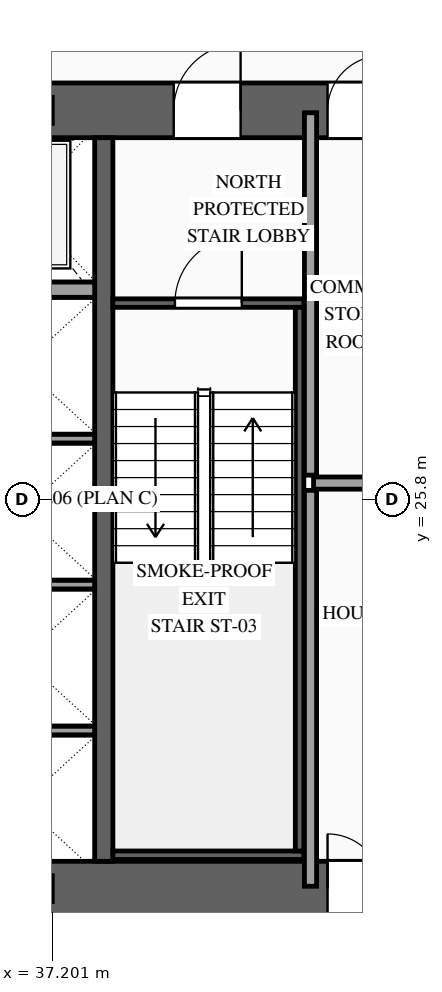
"""IFC4 building model, lengths in metres.
Left out: names, types, materials, properties, quantities, classifications, styles, units other than length and angle.
Written with IfcOpenShell. Run it as: python <this file> out.ifc"""

import sys

from ifc_helpers import new_model, si_unit, direction, frame, frame_2d, origin, origin_2d, place, context, subcontext, project, spatial, rectangle, i_section, extrude, source, transform, mapped, element, fill, save


model = new_model("IFC4")
c1 = context("Model", 3, precision=1e-05, world=origin(), true_north=direction((0.0, 1.0)))
c2 = subcontext(c1, "Body", "Model", "MODEL_VIEW")
j1 = project(units=[si_unit("LENGTHUNIT", "METRE"), si_unit("PLANEANGLEUNIT", "RADIAN")], contexts=[c1])
p1 = place(None, origin())
s1 = spatial("IfcSite", under=j1, at=p1, CompositionType="ELEMENT")
p2 = place(p1, origin())
s2 = spatial("IfcBuilding", under=s1, at=p2, CompositionType="ELEMENT")
p3 = place(p2, frame((0.0, 0.0, 67.6)))
s3 = spatial("IfcBuildingStorey", under=s2, at=p3, CompositionType="ELEMENT", Elevation=67.6)
p4 = place(p3, frame((23.35, 19.4, 0.0), z_axis=(0.0, 0.0, 1.0), x_axis=(1.0, 0.0, 0.0)))
e1 = element("IfcWall", 1, at=p4, inside=s3, PredefinedType="SHEAR", context=c2, shape_type="SweptSolid", body=[
    extrude(rectangle(XDim=27.3, YDim=0.9, at=frame_2d((13.65, 0.0))), origin(), (0.0, 0.0, 1.0), 3.6),
])
p5 = place(p4, frame((2.1, 0.0, 0.0)))
e2 = element("IfcOpeningElement", 2, at=p5, cuts=e1, PredefinedType="OPENING", context=c2, shape_type="SweptSolid", body=[
    extrude(rectangle(XDim=1.1, YDim=2.2, at=frame_2d((0.55, 1.1))), frame((0.0, 0.465, 0.0), z_axis=(0.0, -1.0, 0.0), x_axis=(1.0, 0.0, 0.0)), (0.0, 0.0, 1.0), 0.93),
])
p6 = place(p4, frame((10.0, 0.0, 0.0)))
e3 = element("IfcOpeningElement", 3, at=p6, cuts=e1, PredefinedType="OPENING", context=c2, shape_type="SweptSolid", body=[
    extrude(rectangle(XDim=1.1, YDim=2.2, at=frame_2d((0.55, 1.1))), frame((0.0, 0.465, 0.0), z_axis=(0.0, -1.0, 0.0), x_axis=(1.0, 0.0, 0.0)), (0.0, 0.0, 1.0), 0.93),
])
p7 = place(p4, frame((23.2, 0.0, 0.0)))
e4 = element("IfcOpeningElement", 4, at=p7, cuts=e1, PredefinedType="OPENING", context=c2, shape_type="SweptSolid", body=[
    extrude(rectangle(XDim=1.1, YDim=2.2, at=frame_2d((0.55, 1.1))), frame((0.0, 0.465, 0.0), z_axis=(0.0, -1.0, 0.0), x_axis=(1.0, 0.0, 0.0)), (0.0, 0.0, 1.0), 0.93),
])
p8 = place(p4, frame((19.82, 0.0, 0.0)))
e5 = element("IfcOpeningElement", 5, at=p8, cuts=e1, PredefinedType="OPENING", context=c2, shape_type="SweptSolid", body=[
    extrude(rectangle(XDim=0.9, YDim=2.15, at=frame_2d((0.45, 1.075))), frame((0.0, 0.465, 0.0), z_axis=(0.0, -1.0, 0.0), x_axis=(1.0, 0.0, 0.0)), (0.0, 0.0, 1.0), 0.93),
])
p9 = place(p4, frame((18.38, 0.0, 0.0)))
e6 = element("IfcOpeningElement", 6, at=p9, cuts=e1, PredefinedType="OPENING", context=c2, shape_type="SweptSolid", body=[
    extrude(rectangle(XDim=0.9, YDim=2.15, at=frame_2d((0.45, 1.075))), frame((0.0, 0.465, 0.0), z_axis=(0.0, -1.0, 0.0), x_axis=(1.0, 0.0, 0.0)), (0.0, 0.0, 1.0), 0.93),
])
p10 = place(p3, frame((23.35, 32.2, 0.0), z_axis=(0.0, 0.0, 1.0), x_axis=(1.0, 0.0, 0.0)))
e7 = element("IfcWall", 7, at=p10, inside=s3, PredefinedType="SHEAR", context=c2, shape_type="SweptSolid", body=[
    extrude(rectangle(XDim=27.3, YDim=0.9, at=frame_2d((13.65, 0.0))), origin(), (0.0, 0.0, 1.0), 3.6),
])
p11 = place(p10, frame((4.72, 0.0, 0.0)))
e8 = element("IfcOpeningElement", 8, at=p11, cuts=e7, PredefinedType="OPENING", context=c2, shape_type="SweptSolid", body=[
    extrude(rectangle(XDim=0.9, YDim=2.15, at=frame_2d((0.45, 1.075))), frame((0.0, 0.465, 0.0), z_axis=(0.0, -1.0, 0.0), x_axis=(1.0, 0.0, 0.0)), (0.0, 0.0, 1.0), 0.93),
])
p12 = place(p10, frame((10.0, 0.0, 0.0)))
e9 = element("IfcOpeningElement", 9, at=p12, cuts=e7, PredefinedType="OPENING", context=c2, shape_type="SweptSolid", body=[
    extrude(rectangle(XDim=1.1, YDim=2.2, at=frame_2d((0.55, 1.1))), frame((0.0, 0.465, 0.0), z_axis=(0.0, -1.0, 0.0), x_axis=(1.0, 0.0, 0.0)), (0.0, 0.0, 1.0), 0.93),
])
p13 = place(p10, frame((15.85, 0.0, 0.0)))
e10 = element("IfcOpeningElement", 10, at=p13, cuts=e7, PredefinedType="OPENING", context=c2, shape_type="SweptSolid", body=[
    extrude(rectangle(XDim=1.1, YDim=2.2, at=frame_2d((0.55, 1.1))), frame((0.0, 0.465, 0.0), z_axis=(0.0, -1.0, 0.0), x_axis=(1.0, 0.0, 0.0)), (0.0, 0.0, 1.0), 0.93),
])
p14 = place(p10, frame((18.38, 0.0, 0.0)))
e11 = element("IfcOpeningElement", 11, at=p14, cuts=e7, PredefinedType="OPENING", context=c2, shape_type="SweptSolid", body=[
    extrude(rectangle(XDim=0.9, YDim=2.15, at=frame_2d((0.45, 1.075))), frame((0.0, 0.465, 0.0), z_axis=(0.0, -1.0, 0.0), x_axis=(1.0, 0.0, 0.0)), (0.0, 0.0, 1.0), 0.93),
])
p15 = place(p10, frame((19.82, 0.0, 0.0)))
e12 = element("IfcOpeningElement", 12, at=p15, cuts=e7, PredefinedType="OPENING", context=c2, shape_type="SweptSolid", body=[
    extrude(rectangle(XDim=0.9, YDim=2.15, at=frame_2d((0.45, 1.075))), frame((0.0, 0.465, 0.0), z_axis=(0.0, -1.0, 0.0), x_axis=(1.0, 0.0, 0.0)), (0.0, 0.0, 1.0), 0.93),
])
m1 = source(origin(), c2, "Body", "SweptSolid", [
    extrude(rectangle(XDim=11.9, YDim=0.3, at=frame_2d((5.95, 0.0))), origin(), (0.0, 0.0, 1.0), 3.6),
])
p16 = place(p3, frame((38.05, 19.85, 0.0), z_axis=(0.0, 0.0, 1.0), x_axis=(0.0, 1.0, 0.0)))
e13 = element("IfcWall", 13, at=p16, inside=s3, PredefinedType="SOLIDWALL", context=c2, shape_type="MappedRepresentation", body=[
    mapped(m1, transform((0.0, 0.0, 0.0), scale=1.0)),
])
m2 = source(origin(), c2, "Body", "SweptSolid", [
    extrude(i_section(OverallWidth=0.407, OverallDepth=0.428, WebThickness=0.02, FlangeThickness=0.035, at=origin_2d()), origin(), (0.0, 0.0, 1.0), 3.6),
])
for number, where, z_axis, x_axis in (
    (14, (37.0, 19.4, 0.0), (0.0, 0.0, 1.0), (1.0, 0.0, 0.0)),
    (15, (37.0, 32.2, 0.0), (0.0, 0.0, 1.0), (1.0, 0.0, 0.0)),
):
    element("IfcColumn", number, at=place(p3, frame(where, z_axis=z_axis, x_axis=x_axis)), inside=s3, PredefinedType="COLUMN", context=c2, shape_type="MappedRepresentation", body=[
        mapped(m2, transform((0.0, 0.0, 0.0), scale=1.0)),
    ])
m3 = source(origin(), c2, "Body", "SweptSolid", [
    extrude(rectangle(XDim=2.4, YDim=0.14, at=frame_2d((1.2, 0.0))), origin(), (0.0, 0.0, 1.0), 3.38),
])
for number, where, z_axis, x_axis in (
    (16, (35.5, 22.0, 0.0), (0.0, 0.0, 1.0), (1.0, 0.0, 0.0)),
    (17, (35.5, 24.4, 0.0), (0.0, 0.0, 1.0), (1.0, 0.0, 0.0)),
    (18, (35.5, 26.8, 0.0), (0.0, 0.0, 1.0), (1.0, 0.0, 0.0)),
):
    element("IfcWall", number, at=place(p3, frame(where, z_axis=z_axis, x_axis=x_axis)), inside=s3, PredefinedType="SOLIDWALL", context=c2, shape_type="MappedRepresentation", body=[
        mapped(m3, transform((0.0, 0.0, 0.0), scale=1.0)),
    ])
m4 = source(origin(), c2, "Body", "SweptSolid", [
    extrude(rectangle(XDim=2.4, YDim=0.25, at=frame_2d((1.2, 0.0))), origin(), (0.0, 0.0, 1.0), 3.38),
])
p17 = place(p3, frame((35.5, 29.25, 0.0), z_axis=(0.0, 0.0, 1.0), x_axis=(1.0, 0.0, 0.0)))
e19 = element("IfcWall", 19, at=p17, inside=s3, PredefinedType="SOLIDWALL", context=c2, shape_type="MappedRepresentation", body=[
    mapped(m4, transform((0.0, 0.0, 0.0), scale=1.0)),
])
p18 = place(p3, frame((38.2, 29.03, 0.0), z_axis=(0.0, 0.0, 1.0), x_axis=(1.0, 0.0, 0.0)))
e20 = element("IfcWall", 20, at=p18, inside=s3, PredefinedType="SOLIDWALL", context=c2, shape_type="SweptSolid", body=[
    extrude(rectangle(XDim=3.14, YDim=0.14, at=frame_2d((1.57, 0.0))), origin(), (0.0, 0.0, 1.0), 3.38),
])
p19 = place(p18, frame((1.02, 0.0, 0.0)))
e21 = element("IfcOpeningElement", 21, at=p19, cuts=e20, PredefinedType="OPENING", context=c2, shape_type="SweptSolid", body=[
    extrude(rectangle(XDim=1.1, YDim=2.2, at=frame_2d((0.55, 1.1))), frame((0.0, 0.085, 0.0), z_axis=(0.0, -1.0, 0.0), x_axis=(1.0, 0.0, 0.0)), (0.0, 0.0, 1.0), 0.17),
])
m5 = source(origin(), c2, "Body", "SweptSolid", [
    extrude(rectangle(XDim=3.14, YDim=0.14, at=frame_2d((1.57, 0.0))), origin(), (0.0, 0.0, 1.0), 3.38),
])
p20 = place(p3, frame((38.2, 19.95, 0.0), z_axis=(0.0, 0.0, 1.0), x_axis=(1.0, 0.0, 0.0)))
e22 = element("IfcWall", 22, at=p20, inside=s3, PredefinedType="SOLIDWALL", context=c2, shape_type="MappedRepresentation", body=[
    mapped(m5, transform((0.0, 0.0, 0.0), scale=1.0)),
])
m6 = source(origin(), c2, "Body", "SweptSolid", [
    extrude(rectangle(XDim=8.94, YDim=0.14, at=frame_2d((4.47, 0.0))), origin(), (0.0, 0.0, 1.0), 3.38),
])
p21 = place(p3, frame((41.27, 20.02, 0.0), z_axis=(0.0, 0.0, 1.0), x_axis=(0.0, 1.0, 0.0)))
e23 = element("IfcWall", 23, at=p21, inside=s3, PredefinedType="SOLIDWALL", context=c2, shape_type="MappedRepresentation", body=[
    mapped(m6, transform((0.0, 0.0, 0.0), scale=1.0)),
])
m7 = source(origin(), c2, "Body", "SweptSolid", [
    extrude(rectangle(XDim=6.51, YDim=0.2, at=frame_2d((3.255, 0.0))), origin(), (0.0, 0.0, 1.0), 3.38),
])
p22 = place(p3, frame((41.45, 19.44, 0.0), z_axis=(0.0, 0.0, 1.0), x_axis=(0.0, 1.0, 0.0)))
e24 = element("IfcWall", 24, at=p22, inside=s3, PredefinedType="PARTITIONING", context=c2, shape_type="MappedRepresentation", body=[
    mapped(m7, transform((0.0, 0.0, 0.0), scale=1.0)),
])
m8 = source(origin(), c2, "Body", "SweptSolid", [
    extrude(rectangle(XDim=2.7, YDim=0.2, at=frame_2d((1.35, 0.0))), origin(), (0.0, 0.0, 1.0), 3.38),
])
p23 = place(p3, frame((41.5, 26.07, 0.0), z_axis=(0.0, 0.0, 1.0), x_axis=(1.0, 0.0, 0.0)))
e25 = element("IfcWall", 25, at=p23, inside=s3, PredefinedType="PARTITIONING", context=c2, shape_type="MappedRepresentation", body=[
    mapped(m8, transform((0.0, 0.0, 0.0), scale=1.0)),
])
m9 = source(origin(), c2, "Body", "SweptSolid", [
    extrude(rectangle(XDim=5.96, YDim=0.2, at=frame_2d((2.98, 0.0))), origin(), (0.0, 0.0, 1.0), 3.38),
])
p24 = place(p3, frame((41.45, 26.2, 0.0), z_axis=(0.0, 0.0, 1.0), x_axis=(0.0, 1.0, 0.0)))
e26 = element("IfcWall", 26, at=p24, inside=s3, PredefinedType="PARTITIONING", context=c2, shape_type="MappedRepresentation", body=[
    mapped(m9, transform((0.0, 0.0, 0.0), scale=1.0)),
])
m10 = source(origin(), c2, "Body", "SweptSolid", [
    extrude(rectangle(XDim=1.1, YDim=2.2, at=frame_2d((0.55, 1.1))), frame((0.0, 0.025, 0.0), z_axis=(0.0, -1.0, 0.0), x_axis=(1.0, 0.0, 0.0)), (0.0, 0.0, 1.0), 0.05),
])
p25 = place(p19, origin())
e27 = element("IfcDoor", 27, at=p25, inside=s3, OperationType="SINGLE_SWING_RIGHT", PredefinedType="DOOR", context=c2, shape_type="MappedRepresentation", body=[
    mapped(m10, transform((0.0, 0.0, 0.0), scale=1.0)),
])
fill(e21, e27)
p26 = place(p13, origin())
e28 = element("IfcDoor", 28, at=p26, inside=s3, OperationType="SINGLE_SWING_RIGHT", PredefinedType="DOOR", context=c2, shape_type="MappedRepresentation", body=[
    mapped(m10, transform((0.0, 0.0, 0.0), scale=1.0)),
])
fill(e10, e28)
m11 = source(origin(), c2, "Body", "SweptSolid", [
    extrude(rectangle(XDim=0.9, YDim=2.15, at=frame_2d((0.45, 1.075))), frame((0.0, 0.025, 0.0), z_axis=(0.0, -1.0, 0.0), x_axis=(1.0, 0.0, 0.0)), (0.0, 0.0, 1.0), 0.05),
])
p27 = place(p9, origin())
e29 = element("IfcDoor", 29, at=p27, inside=s3, OperationType="SINGLE_SWING_LEFT", PredefinedType="DOOR", context=c2, shape_type="MappedRepresentation", body=[
    mapped(m11, transform((0.0, 0.0, 0.0), scale=1.0)),
])
fill(e6, e29)
p28 = place(p14, origin())
e30 = element("IfcDoor", 30, at=p28, inside=s3, OperationType="SINGLE_SWING_RIGHT", PredefinedType="DOOR", context=c2, shape_type="MappedRepresentation", body=[
    mapped(m11, transform((0.0, 0.0, 0.0), scale=1.0)),
])
fill(e11, e30)
save(model, sys.argv[1])
